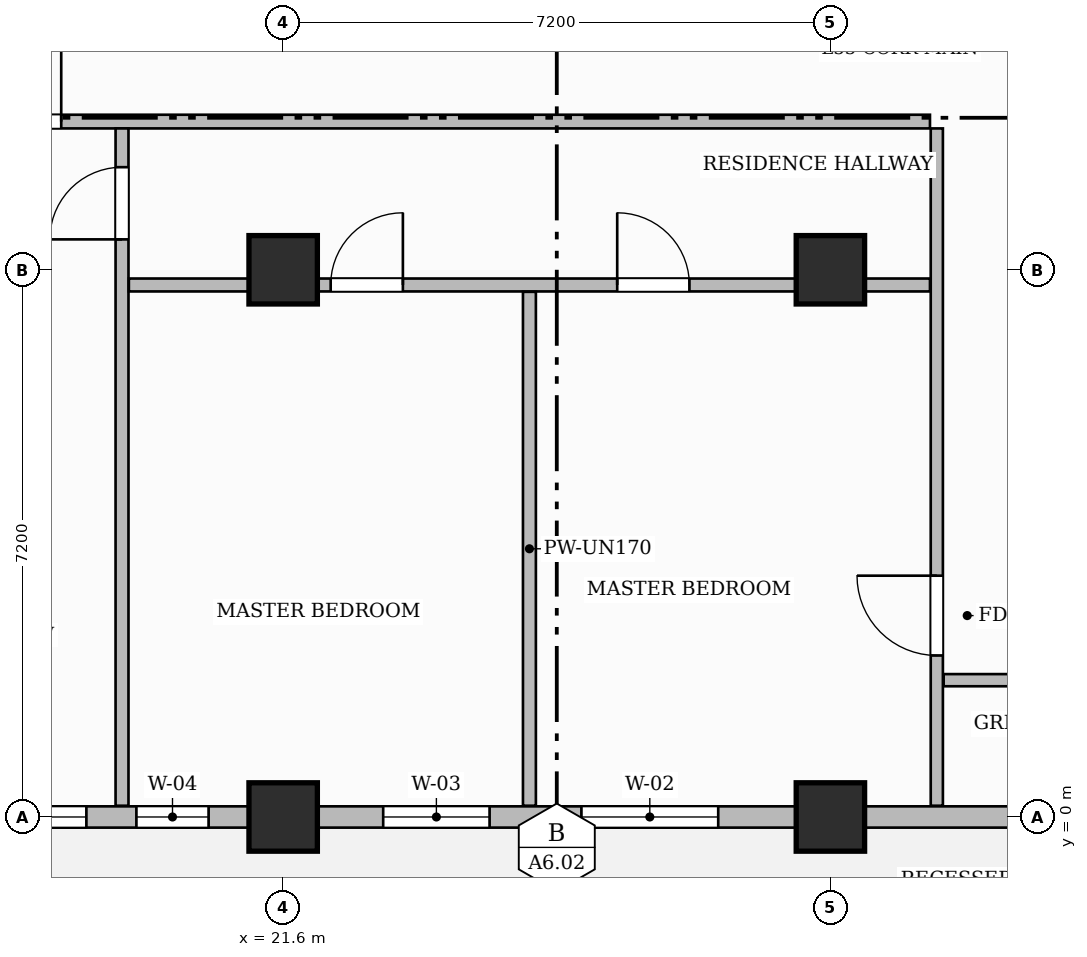
"""IFC4 building model, lengths in metres.
Left out: names, types, materials, properties, quantities, classifications, styles, units other than length and angle.
Written with IfcOpenShell. Run it as: python <this file> out.ifc"""

import sys

from ifc_helpers import new_model, si_unit, direction, frame, frame_2d, origin, origin_2d, place, context, subcontext, project, spatial, rectangle, extrude, source, transform, mapped, element, fill, save


model = new_model("IFC4")
c1 = context("Model", 3, precision=1e-05, world=origin(), true_north=direction((0.0, 1.0)))
c2 = subcontext(c1, "Body", "Model", "MODEL_VIEW")
j1 = project(units=[si_unit("LENGTHUNIT", "METRE"), si_unit("PLANEANGLEUNIT", "RADIAN")], contexts=[c1])
p1 = place(None, origin())
s1 = spatial("IfcSite", under=j1, at=p1, CompositionType="ELEMENT")
p2 = place(p1, origin())
s2 = spatial("IfcBuilding", under=s1, at=p2, CompositionType="ELEMENT")
p3 = place(p2, frame((0.0, 0.0, 221.15)))
s3 = spatial("IfcBuildingStorey", under=s2, at=p3, CompositionType="ELEMENT", Elevation=221.15)
m1 = source(origin(), c2, "Body", "SweptSolid", [
    extrude(rectangle(XDim=0.9, YDim=0.9, at=origin_2d()), origin(), (0.0, 0.0, 1.0), 3.85),
])
for number, where, z_axis, x_axis in (
    (1, (21.6, 0.0, 0.0), (0.0, 0.0, 1.0), (1.0, 0.0, 0.0)),
    (2, (21.6, 7.2, 0.0), (0.0, 0.0, 1.0), (1.0, 0.0, 0.0)),
    (3, (28.8, 0.0, 0.0), (0.0, 0.0, 1.0), (1.0, 0.0, 0.0)),
    (4, (28.8, 7.2, 0.0), (0.0, 0.0, 1.0), (1.0, 0.0, 0.0)),
):
    element("IfcColumn", number, at=place(p3, frame(where, z_axis=z_axis, x_axis=x_axis)), inside=s3, PredefinedType="COLUMN", context=c2, shape_type="MappedRepresentation", body=[
        mapped(m1, transform((0.0, 0.0, 0.0), scale=1.0)),
    ])
p4 = place(p3, frame((14.548, 9.15, 0.0), z_axis=(0.0, 0.0, 1.0), x_axis=(1.0, 0.0, 0.0)))
e5 = element("IfcWall", 5, at=p4, inside=s3, PredefinedType="PARTITIONING", context=c2, shape_type="SweptSolid", body=[
    extrude(rectangle(XDim=15.562, YDim=0.18, at=frame_2d((7.781, 0.0))), origin(), (0.0, 0.0, 1.0), 3.6),
])
p5 = place(p4, frame((3.082, 0.0, 0.0)))
e6 = element("IfcOpeningElement", 6, at=p5, cuts=e5, PredefinedType="OPENING", context=c2, shape_type="SweptSolid", body=[
    extrude(rectangle(XDim=1.05, YDim=2.25, at=frame_2d((0.525, 1.125))), frame((0.0, 0.1, 0.0), z_axis=(0.0, -1.0, 0.0), x_axis=(1.0, 0.0, 0.0)), (0.0, 0.0, 1.0), 0.2),
])
p6 = place(p3, frame((30.2, 0.148, 0.0), z_axis=(0.0, 0.0, 1.0), x_axis=(0.0, 1.0, 0.0)))
e7 = element("IfcWall", 7, at=p6, inside=s3, PredefinedType="PARTITIONING", context=c2, shape_type="SweptSolid", body=[
    extrude(rectangle(XDim=8.912, YDim=0.16, at=frame_2d((4.456, 0.0))), origin(), (0.0, 0.0, 1.0), 3.6),
])
p7 = place(p6, frame((1.977, 0.0, 0.0)))
e8 = element("IfcOpeningElement", 8, at=p7, cuts=e7, PredefinedType="OPENING", context=c2, shape_type="SweptSolid", body=[
    extrude(rectangle(XDim=1.05, YDim=2.15, at=frame_2d((0.525, 1.075))), frame((0.0, 0.09, 0.0), z_axis=(0.0, -1.0, 0.0), x_axis=(1.0, 0.0, 0.0)), (0.0, 0.0, 1.0), 0.18),
])
p8 = place(p3, frame((30.29, 1.8, 0.0), z_axis=(0.0, 0.0, 1.0), x_axis=(1.0, 0.0, 0.0)))
e9 = element("IfcWall", 9, at=p8, inside=s3, PredefinedType="PARTITIONING", context=c2, shape_type="SweptSolid", body=[
    extrude(rectangle(XDim=19.37, YDim=0.16, at=frame_2d((9.685, 0.0))), origin(), (0.0, 0.0, 1.0), 3.6),
])
p9 = place(p8, frame((9.735, 0.0, 0.0)))
e10 = element("IfcOpeningElement", 10, at=p9, cuts=e9, PredefinedType="OPENING", context=c2, shape_type="SweptSolid", body=[
    extrude(rectangle(XDim=0.95, YDim=2.15, at=frame_2d((0.475, 1.075))), frame((0.0, 0.09, 0.0), z_axis=(0.0, -1.0, 0.0), x_axis=(1.0, 0.0, 0.0)), (0.0, 0.0, 1.0), 0.18),
])
p10 = place(p3, frame((19.48, 0.148, 0.0), z_axis=(0.0, 0.0, 1.0), x_axis=(0.0, 1.0, 0.0)))
e11 = element("IfcWall", 11, at=p10, inside=s3, PredefinedType="PARTITIONING", context=c2, shape_type="SweptSolid", body=[
    extrude(rectangle(XDim=8.912, YDim=0.17, at=frame_2d((4.456, 0.0))), origin(), (0.0, 0.0, 1.0), 3.6),
])
p11 = place(p10, frame((7.452, 0.0, 0.0)))
e12 = element("IfcOpeningElement", 12, at=p11, cuts=e11, PredefinedType="OPENING", context=c2, shape_type="SweptSolid", body=[
    extrude(rectangle(XDim=0.95, YDim=2.15, at=frame_2d((0.475, 1.075))), frame((0.0, 0.095, 0.0), z_axis=(0.0, -1.0, 0.0), x_axis=(1.0, 0.0, 0.0)), (0.0, 0.0, 1.0), 0.19),
])
p12 = place(p3, frame((19.57, 7.0, 0.0), z_axis=(0.0, 0.0, 1.0), x_axis=(1.0, 0.0, 0.0)))
e13 = element("IfcWall", 13, at=p12, inside=s3, PredefinedType="PARTITIONING", context=c2, shape_type="SweptSolid", body=[
    extrude(rectangle(XDim=10.54, YDim=0.17, at=frame_2d((5.27, 0.0))), origin(), (0.0, 0.0, 1.0), 3.135),
])
p13 = place(p12, frame((2.655, 0.0, 0.0)))
e14 = element("IfcOpeningElement", 14, at=p13, cuts=e13, PredefinedType="OPENING", context=c2, shape_type="SweptSolid", body=[
    extrude(rectangle(XDim=0.95, YDim=2.15, at=frame_2d((0.475, 1.075))), frame((0.0, 0.095, 0.0), z_axis=(0.0, -1.0, 0.0), x_axis=(1.0, 0.0, 0.0)), (0.0, 0.0, 1.0), 0.19),
])
p14 = place(p12, frame((6.425, 0.0, 0.0)))
e15 = element("IfcOpeningElement", 15, at=p14, cuts=e13, PredefinedType="OPENING", context=c2, shape_type="SweptSolid", body=[
    extrude(rectangle(XDim=0.95, YDim=2.15, at=frame_2d((0.475, 1.075))), frame((0.0, 0.095, 0.0), z_axis=(0.0, -1.0, 0.0), x_axis=(1.0, 0.0, 0.0)), (0.0, 0.0, 1.0), 0.19),
])
p15 = place(p3, frame((24.84, 0.148, 0.0), z_axis=(0.0, 0.0, 1.0), x_axis=(0.0, 1.0, 0.0)))
e16 = element("IfcWall", 16, at=p15, inside=s3, PredefinedType="PARTITIONING", context=c2, shape_type="SweptSolid", body=[
    extrude(rectangle(XDim=6.762, YDim=0.17, at=frame_2d((3.381, 0.0))), origin(), (0.0, 0.0, 1.0), 3.6),
])
p16 = place(p3, frame((14.4, 0.0, 0.0), z_axis=(0.0, 0.0, 1.0), x_axis=(1.0, 0.0, 0.0)))
e17 = element("IfcWall", 17, at=p16, inside=s3, PredefinedType="SOLIDWALL", context=c2, shape_type="SweptSolid", body=[
    extrude(rectangle(XDim=35.4, YDim=0.28, at=frame_2d((17.7, 0.0))), origin(), (0.0, 0.0, 1.0), 3.135),
])
p17 = place(p16, frame((0.85, 0.0, 0.0)))
e18 = element("IfcOpeningElement", 18, at=p17, cuts=e17, PredefinedType="OPENING", context=c2, shape_type="SweptSolid", body=[
    extrude(rectangle(XDim=1.2, YDim=2.2, at=frame_2d((0.6, 1.1))), frame((0.0, 0.15, 0.0), z_axis=(0.0, -1.0, 0.0), x_axis=(1.0, 0.0, 0.0)), (0.0, 0.0, 1.0), 0.3),
])
p18 = place(p16, frame((2.811, 0.0, 0.8)))
e19 = element("IfcOpeningElement", 19, at=p18, cuts=e17, PredefinedType="OPENING", context=c2, shape_type="SweptSolid", body=[
    extrude(rectangle(XDim=1.8, YDim=1.85, at=frame_2d((0.9, 0.925))), frame((0.0, 0.15, 0.0), z_axis=(0.0, -1.0, 0.0), x_axis=(1.0, 0.0, 0.0)), (0.0, 0.0, 1.0), 0.3),
])
p19 = place(p16, frame((5.269, 0.0, 0.8)))
e20 = element("IfcOpeningElement", 20, at=p19, cuts=e17, PredefinedType="OPENING", context=c2, shape_type="SweptSolid", body=[
    extrude(rectangle(XDim=0.95, YDim=1.75, at=frame_2d((0.475, 0.875))), frame((0.0, 0.15, 0.0), z_axis=(0.0, -1.0, 0.0), x_axis=(1.0, 0.0, 0.0)), (0.0, 0.0, 1.0), 0.3),
])
p20 = place(p16, frame((8.516, 0.0, 0.8)))
e21 = element("IfcOpeningElement", 21, at=p20, cuts=e17, PredefinedType="OPENING", context=c2, shape_type="SweptSolid", body=[
    extrude(rectangle(XDim=1.4, YDim=1.85, at=frame_2d((0.7, 0.925))), frame((0.0, 0.15, 0.0), z_axis=(0.0, -1.0, 0.0), x_axis=(1.0, 0.0, 0.0)), (0.0, 0.0, 1.0), 0.3),
])
p21 = place(p16, frame((11.124, 0.0, 0.8)))
e22 = element("IfcOpeningElement", 22, at=p21, cuts=e17, PredefinedType="OPENING", context=c2, shape_type="SweptSolid", body=[
    extrude(rectangle(XDim=1.8, YDim=1.85, at=frame_2d((0.9, 0.925))), frame((0.0, 0.15, 0.0), z_axis=(0.0, -1.0, 0.0), x_axis=(1.0, 0.0, 0.0)), (0.0, 0.0, 1.0), 0.3),
])
p22 = place(p16, frame((16.804, 0.0, 0.8)))
e23 = element("IfcOpeningElement", 23, at=p22, cuts=e17, PredefinedType="OPENING", context=c2, shape_type="SweptSolid", body=[
    extrude(rectangle(XDim=1.8, YDim=1.85, at=frame_2d((0.9, 0.925))), frame((0.0, 0.15, 0.0), z_axis=(0.0, -1.0, 0.0), x_axis=(1.0, 0.0, 0.0)), (0.0, 0.0, 1.0), 0.3),
])
p23 = place(p16, frame((21.725, 0.0, 0.8)))
e24 = element("IfcOpeningElement", 24, at=p23, cuts=e17, PredefinedType="OPENING", context=c2, shape_type="SweptSolid", body=[
    extrude(rectangle(XDim=1.8, YDim=1.85, at=frame_2d((0.9, 0.925))), frame((0.0, 0.15, 0.0), z_axis=(0.0, -1.0, 0.0), x_axis=(1.0, 0.0, 0.0)), (0.0, 0.0, 1.0), 0.3),
])
p24 = place(p16, frame((24.475, 0.0, 0.8)))
e25 = element("IfcOpeningElement", 25, at=p24, cuts=e17, PredefinedType="OPENING", context=c2, shape_type="SweptSolid", body=[
    extrude(rectangle(XDim=1.8, YDim=1.85, at=frame_2d((0.9, 0.925))), frame((0.0, 0.15, 0.0), z_axis=(0.0, -1.0, 0.0), x_axis=(1.0, 0.0, 0.0)), (0.0, 0.0, 1.0), 0.3),
])
p25 = place(p16, frame((29.075, 0.0, 0.8)))
e26 = element("IfcOpeningElement", 26, at=p25, cuts=e17, PredefinedType="OPENING", context=c2, shape_type="SweptSolid", body=[
    extrude(rectangle(XDim=1.8, YDim=1.85, at=frame_2d((0.9, 0.925))), frame((0.0, 0.15, 0.0), z_axis=(0.0, -1.0, 0.0), x_axis=(1.0, 0.0, 0.0)), (0.0, 0.0, 1.0), 0.3),
])
p26 = place(p16, frame((32.125, 0.0, 0.8)))
e27 = element("IfcOpeningElement", 27, at=p26, cuts=e17, PredefinedType="OPENING", context=c2, shape_type="SweptSolid", body=[
    extrude(rectangle(XDim=1.8, YDim=1.85, at=frame_2d((0.9, 0.925))), frame((0.0, 0.15, 0.0), z_axis=(0.0, -1.0, 0.0), x_axis=(1.0, 0.0, 0.0)), (0.0, 0.0, 1.0), 0.3),
])
m2 = source(origin(), c2, "Body", "SweptSolid", [
    extrude(rectangle(XDim=1.05, YDim=2.15, at=frame_2d((0.525, 1.075))), frame((0.0, 0.025, 0.0), z_axis=(0.0, -1.0, 0.0), x_axis=(1.0, 0.0, 0.0)), (0.0, 0.0, 1.0), 0.05),
])
p27 = place(p7, origin())
e28 = element("IfcDoor", 28, at=p27, inside=s3, OperationType="SINGLE_SWING_RIGHT", PredefinedType="DOOR", context=c2, shape_type="MappedRepresentation", body=[
    mapped(m2, transform((0.0, 0.0, 0.0), scale=1.0)),
])
fill(e8, e28)
m3 = source(origin(), c2, "Body", "SweptSolid", [
    extrude(rectangle(XDim=1.05, YDim=2.25, at=frame_2d((0.525, 1.125))), frame((0.0, 0.025, 0.0), z_axis=(0.0, -1.0, 0.0), x_axis=(1.0, 0.0, 0.0)), (0.0, 0.0, 1.0), 0.05),
])
p28 = place(p5, origin())
e29 = element("IfcDoor", 29, at=p28, inside=s3, OperationType="SINGLE_SWING_RIGHT", PredefinedType="DOOR", context=c2, shape_type="MappedRepresentation", body=[
    mapped(m3, transform((0.0, 0.0, 0.0), scale=1.0)),
])
fill(e6, e29)
m4 = source(origin(), c2, "Body", "SweptSolid", [
    extrude(rectangle(XDim=0.95, YDim=2.15, at=frame_2d((0.475, 1.075))), frame((0.0, 0.025, 0.0), z_axis=(0.0, -1.0, 0.0), x_axis=(1.0, 0.0, 0.0)), (0.0, 0.0, 1.0), 0.05),
])
p29 = place(p11, origin())
e30 = element("IfcDoor", 30, at=p29, inside=s3, OperationType="SINGLE_SWING_LEFT", PredefinedType="DOOR", context=c2, shape_type="MappedRepresentation", body=[
    mapped(m4, transform((0.0, 0.0, 0.0), scale=1.0)),
])
fill(e12, e30)
p30 = place(p13, origin())
e31 = element("IfcDoor", 31, at=p30, inside=s3, OperationType="SINGLE_SWING_RIGHT", PredefinedType="DOOR", context=c2, shape_type="MappedRepresentation", body=[
    mapped(m4, transform((0.0, 0.0, 0.0), scale=1.0)),
])
fill(e14, e31)
p31 = place(p14, origin())
e32 = element("IfcDoor", 32, at=p31, inside=s3, OperationType="SINGLE_SWING_LEFT", PredefinedType="DOOR", context=c2, shape_type="MappedRepresentation", body=[
    mapped(m4, transform((0.0, 0.0, 0.0), scale=1.0)),
])
fill(e15, e32)
m5 = source(origin(), c2, "Body", "SweptSolid", [
    extrude(rectangle(XDim=1.8, YDim=1.85, at=frame_2d((0.9, 0.925))), frame((0.0, 0.03, 0.0), z_axis=(0.0, -1.0, 0.0), x_axis=(1.0, 0.0, 0.0)), (0.0, 0.0, 1.0), 0.06),
])
p32 = place(p18, origin())
e33 = element("IfcWindow", 33, at=p32, inside=s3, PartitioningType="DOUBLE_PANEL_VERTICAL", PredefinedType="WINDOW", context=c2, shape_type="MappedRepresentation", body=[
    mapped(m5, transform((0.0, 0.0, 0.0), scale=1.0)),
])
fill(e19, e33)
m6 = source(origin(), c2, "Body", "SweptSolid", [
    extrude(rectangle(XDim=0.95, YDim=1.75, at=frame_2d((0.475, 0.875))), frame((0.0, 0.03, 0.0), z_axis=(0.0, -1.0, 0.0), x_axis=(1.0, 0.0, 0.0)), (0.0, 0.0, 1.0), 0.06),
])
p33 = place(p19, origin())
e34 = element("IfcWindow", 34, at=p33, inside=s3, PartitioningType="SINGLE_PANEL", PredefinedType="WINDOW", context=c2, shape_type="MappedRepresentation", body=[
    mapped(m6, transform((0.0, 0.0, 0.0), scale=1.0)),
])
fill(e20, e34)
m7 = source(origin(), c2, "Body", "SweptSolid", [
    extrude(rectangle(XDim=1.4, YDim=1.85, at=frame_2d((0.7, 0.925))), frame((0.0, 0.03, 0.0), z_axis=(0.0, -1.0, 0.0), x_axis=(1.0, 0.0, 0.0)), (0.0, 0.0, 1.0), 0.06),
])
p34 = place(p20, origin())
e35 = element("IfcWindow", 35, at=p34, inside=s3, PartitioningType="SINGLE_PANEL", PredefinedType="WINDOW", context=c2, shape_type="MappedRepresentation", body=[
    mapped(m7, transform((0.0, 0.0, 0.0), scale=1.0)),
])
fill(e21, e35)
p35 = place(p21, origin())
e36 = element("IfcWindow", 36, at=p35, inside=s3, PartitioningType="DOUBLE_PANEL_VERTICAL", PredefinedType="WINDOW", context=c2, shape_type="MappedRepresentation", body=[
    mapped(m5, transform((0.0, 0.0, 0.0), scale=1.0)),
])
fill(e22, e36)
save(model, sys.argv[1])
